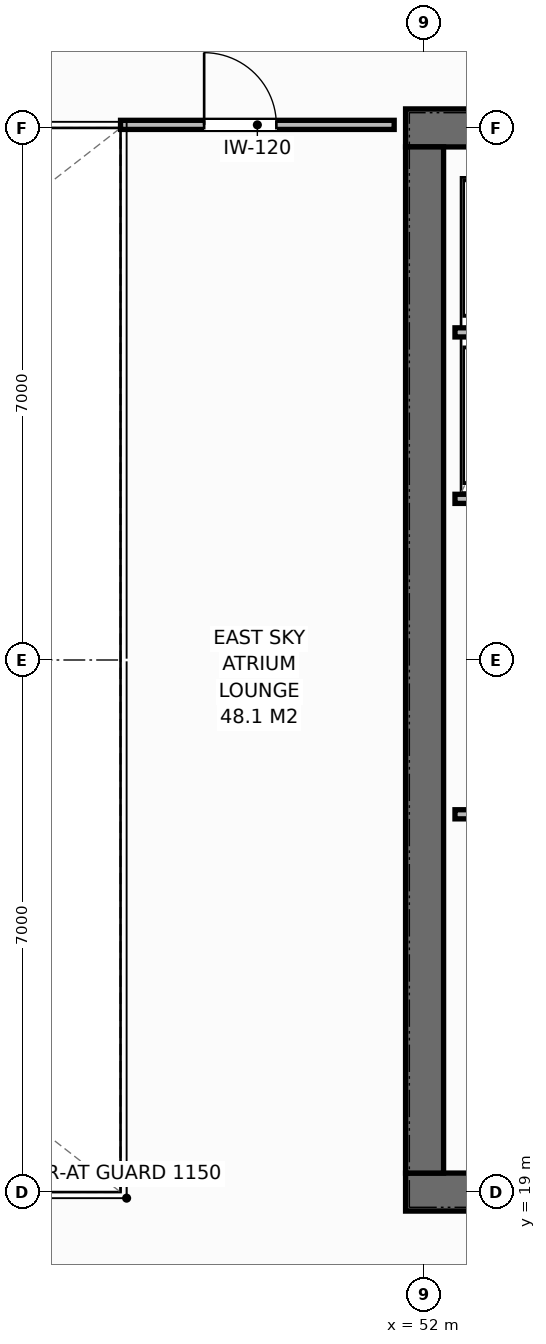
"""IFC4 building model, lengths in metres.
Left out: names, types, materials, properties, quantities, classifications, styles, units other than length and angle.
Written with IfcOpenShell. Run it as: python <this file> out.ifc"""

import sys

from ifc_helpers import new_model, si_unit, direction, frame, frame_2d, origin, place, context, subcontext, project, spatial, rectangle, extrude, element, fill, save


model = new_model("IFC4")
c1 = context("Model", 3, precision=1e-05, world=origin(), true_north=direction((0.0, 1.0)))
c2 = subcontext(c1, "Body", "Model", "MODEL_VIEW")
j1 = project(units=[si_unit("LENGTHUNIT", "METRE"), si_unit("PLANEANGLEUNIT", "RADIAN")], contexts=[c1])
p1 = place(None, origin())
s1 = spatial("IfcSite", under=j1, at=p1, CompositionType="ELEMENT")
p2 = place(p1, origin())
s2 = spatial("IfcBuilding", under=s1, at=p2, CompositionType="ELEMENT")
p3 = place(p2, frame((0.0, 0.0, 270.8)))
s3 = spatial("IfcBuildingStorey", under=s2, at=p3, CompositionType="ELEMENT", Elevation=270.8)
p4 = place(p3, frame((51.75, 19.0, 0.0), z_axis=(0.0, 0.0, 1.0), x_axis=(1.0, 0.0, 0.0)))
e1 = element("IfcWall", 1, at=p4, inside=s3, PredefinedType="SHEAR", context=c2, shape_type="SweptSolid", body=[
    extrude(rectangle(XDim=13.5, YDim=0.5, at=frame_2d((6.75, 0.0))), origin(), (0.0, 0.0, 1.0), 3.8),
])
p5 = place(p4, frame((2.97, 0.0, 0.0)))
e2 = element("IfcOpeningElement", 2, at=p5, cuts=e1, PredefinedType="OPENING", context=c2, shape_type="SweptSolid", body=[
    extrude(rectangle(XDim=1.4, YDim=2.2, at=frame_2d((0.7, 1.1))), frame((0.0, 0.26, 0.0), z_axis=(0.0, -1.0, 0.0), x_axis=(1.0, 0.0, 0.0)), (0.0, 0.0, 1.0), 0.52),
])
p6 = place(p3, frame((51.75, 33.0, 0.0), z_axis=(0.0, 0.0, 1.0), x_axis=(1.0, 0.0, 0.0)))
e3 = element("IfcWall", 3, at=p6, inside=s3, PredefinedType="SHEAR", context=c2, shape_type="SweptSolid", body=[
    extrude(rectangle(XDim=13.5, YDim=0.5, at=frame_2d((6.75, 0.0))), origin(), (0.0, 0.0, 1.0), 3.8),
])
p7 = place(p6, frame((2.97, 0.0, 0.0)))
e4 = element("IfcOpeningElement", 4, at=p7, cuts=e3, PredefinedType="OPENING", context=c2, shape_type="SweptSolid", body=[
    extrude(rectangle(XDim=1.4, YDim=2.2, at=frame_2d((0.7, 1.1))), frame((0.0, 0.26, 0.0), z_axis=(0.0, -1.0, 0.0), x_axis=(1.0, 0.0, 0.0)), (0.0, 0.0, 1.0), 0.52),
])
p8 = place(p6, frame((10.85, 0.0, 0.0)))
e5 = element("IfcOpeningElement", 5, at=p8, cuts=e3, PredefinedType="OPENING", context=c2, shape_type="SweptSolid", body=[
    extrude(rectangle(XDim=0.9, YDim=2.15, at=frame_2d((0.45, 1.075))), frame((0.0, 0.26, 0.0), z_axis=(0.0, -1.0, 0.0), x_axis=(1.0, 0.0, 0.0)), (0.0, 0.0, 1.0), 0.52),
])
p9 = place(p6, frame((5.8, 0.0, 0.0)))
e6 = element("IfcOpeningElement", 6, at=p9, cuts=e3, PredefinedType="OPENING", context=c2, shape_type="SweptSolid", body=[
    extrude(rectangle(XDim=0.9, YDim=2.15, at=frame_2d((0.45, 1.075))), frame((0.0, 0.26, 0.0), z_axis=(0.0, -1.0, 0.0), x_axis=(1.0, 0.0, 0.0)), (0.0, 0.0, 1.0), 0.52),
])
p10 = place(p6, frame((8.2, 0.0, 0.0)))
e7 = element("IfcOpeningElement", 7, at=p10, cuts=e3, PredefinedType="OPENING", context=c2, shape_type="SweptSolid", body=[
    extrude(rectangle(XDim=0.95, YDim=2.15, at=frame_2d((0.475, 1.075))), frame((0.0, 0.26, 0.0), z_axis=(0.0, -1.0, 0.0), x_axis=(1.0, 0.0, 0.0)), (0.0, 0.0, 1.0), 0.52),
])
p11 = place(p3, frame((52.0, 19.25, 0.0), z_axis=(0.0, 0.0, 1.0), x_axis=(0.0, 1.0, 0.0)))
e8 = element("IfcWall", 8, at=p11, inside=s3, PredefinedType="SHEAR", context=c2, shape_type="SweptSolid", body=[
    extrude(rectangle(XDim=13.5, YDim=0.5, at=frame_2d((6.75, 0.0))), origin(), (0.0, 0.0, 1.0), 3.8),
])
for number, where, z_axis, x_axis in (
    (9, (52.4, 23.97, 0.0), (0.0, 0.0, 1.0), (1.0, 0.0, 0.0)),
    (10, (52.4, 28.12, 0.0), (0.0, 0.0, 1.0), (1.0, 0.0, 0.0)),
    (11, (52.4, 30.31, 0.0), (0.0, 0.0, 1.0), (1.0, 0.0, 0.0)),
):
    element("IfcWall", number, at=place(p3, frame(where, z_axis=z_axis, x_axis=x_axis)), inside=s3, PredefinedType="PARTITIONING", context=c2, shape_type="SweptSolid", body=[
        extrude(rectangle(XDim=2.2, YDim=0.12, at=frame_2d((1.1, 0.0))), origin(), (0.0, 0.0, 1.0), 3.588),
    ])
p12 = place(p3, frame((48.0, 33.04, 0.0), z_axis=(0.0, 0.0, 1.0), x_axis=(1.0, 0.0, 0.0)))
e12 = element("IfcWall", 12, at=p12, inside=s3, PredefinedType="PARTITIONING", context=c2, shape_type="SweptSolid", body=[
    extrude(rectangle(XDim=3.6, YDim=0.12, at=frame_2d((1.8, 0.0))), origin(), (0.0, 0.0, 1.0), 3.328),
])
p13 = place(p12, frame((1.1, 0.0, 0.0)))
e13 = element("IfcOpeningElement", 13, at=p13, cuts=e12, PredefinedType="OPENING", context=c2, shape_type="SweptSolid", body=[
    extrude(rectangle(XDim=0.95, YDim=2.15, at=frame_2d((0.475, 1.075))), frame((0.0, 0.07, 0.0), z_axis=(0.0, -1.0, 0.0), x_axis=(1.0, 0.0, 0.0)), (0.0, 0.0, 1.0), 0.14),
])
p14 = place(p13, origin())
e14 = element("IfcDoor", 14, at=p14, inside=s3, OperationType="SINGLE_SWING_LEFT", PredefinedType="DOOR", context=c2, shape_type="SweptSolid", body=[
    extrude(rectangle(XDim=0.95, YDim=2.15, at=frame_2d((0.475, 1.075))), frame((0.0, 0.025, 0.0), z_axis=(0.0, -1.0, 0.0), x_axis=(1.0, 0.0, 0.0)), (0.0, 0.0, 1.0), 0.05),
])
fill(e13, e14)
save(model, sys.argv[1])
